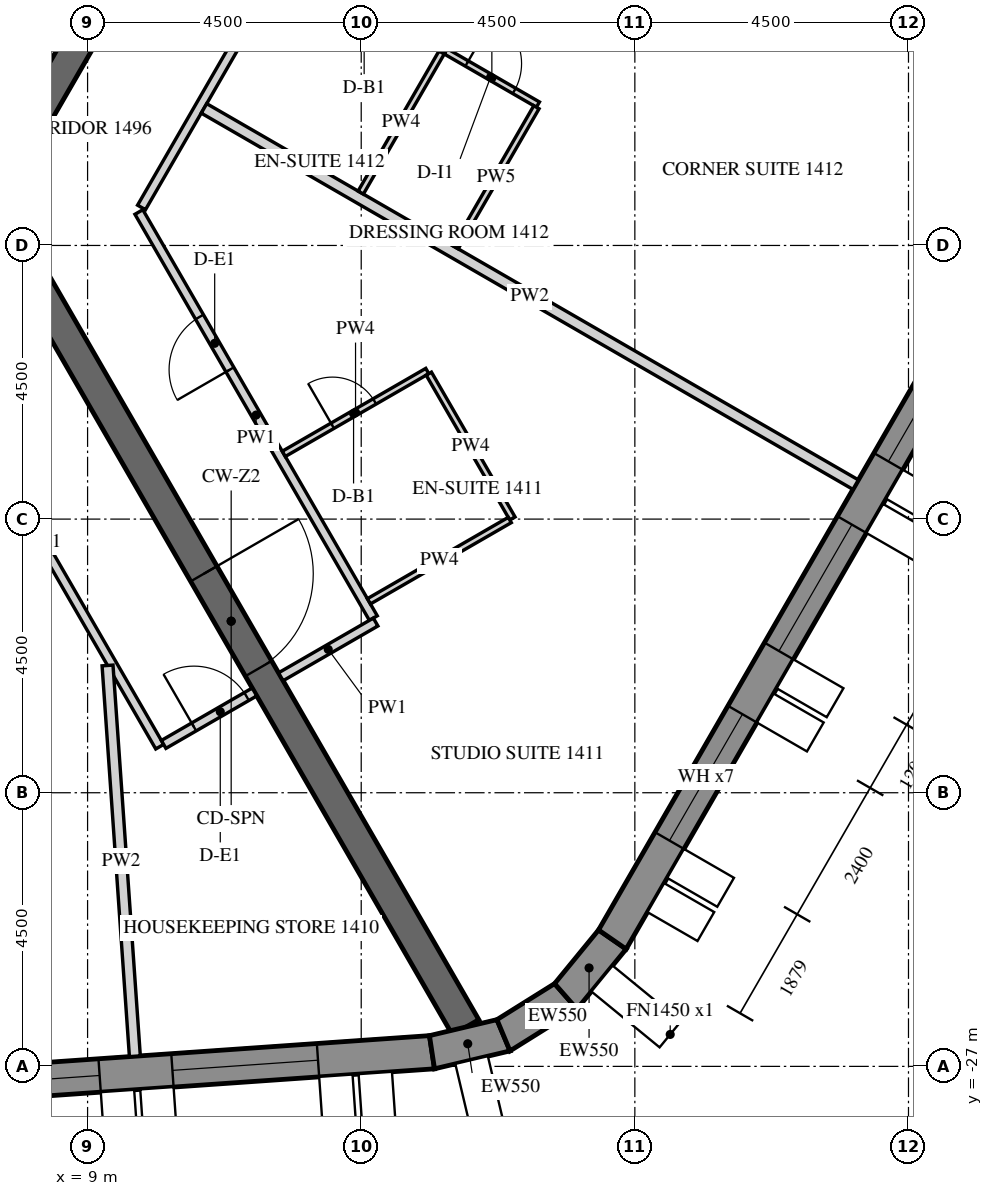
"""IFC4 building model, lengths in metres.
Left out: names, types, materials, properties, quantities, classifications, styles, units other than length and angle.
Written with IfcOpenShell. Run it as: python <this file> out.ifc"""

import sys

from ifc_helpers import new_model, si_unit, direction, frame, frame_2d, origin, place, context, subcontext, project, spatial, polyline, rectangle, outline, extrude, element, fill, save


model = new_model("IFC4")
c1 = context("Model", 3, precision=1e-05, world=origin(), true_north=direction((0.0, 1.0)))
c2 = subcontext(c1, "Body", "Model", "MODEL_VIEW")
j1 = project(units=[si_unit("LENGTHUNIT", "METRE"), si_unit("PLANEANGLEUNIT", "RADIAN")], contexts=[c1])
p1 = place(None, origin())
s1 = spatial("IfcSite", under=j1, at=p1, CompositionType="ELEMENT")
p2 = place(p1, origin())
s2 = spatial("IfcBuilding", under=s1, at=p2, CompositionType="ELEMENT")
p3 = place(p2, frame((0.0, 0.0, 183.9)))
s3 = spatial("IfcBuildingStorey", under=s2, at=p3, CompositionType="ELEMENT", Elevation=183.9)
p4 = place(p3, frame((-13.026, -28.704, -0.15), z_axis=(0.0, 0.0, 1.0), x_axis=(0.99756406806, 0.069756219185, 0.0)))
e1 = element("IfcWall", 1, at=p4, inside=s3, PredefinedType="SOLIDWALL", context=c2, shape_type="SweptSolid", body=[
    extrude(outline(polyline([(-0.026, -0.275), (27.78, -0.275), (27.735, 0.275), (0.026, 0.275), (-0.026, -0.275)])), origin(), (0.0, 0.0, 1.0), 3.9),
])
p5 = place(p4, frame((1.879, 0.0, 1.05)))
e2 = element("IfcOpeningElement", 2, at=p5, cuts=e1, PredefinedType="OPENING", context=c2, shape_type="SweptSolid", body=[
    extrude(rectangle(XDim=2.4, YDim=2.4, at=frame_2d((1.2, 1.2))), frame((0.0, 0.285, 0.0), z_axis=(0.0, -1.0, 0.0), x_axis=(1.0, 0.0, 0.0)), (0.0, 0.0, 1.0), 0.57),
])
p6 = place(p4, frame((5.479, 0.0, 1.05)))
e3 = element("IfcOpeningElement", 3, at=p6, cuts=e1, PredefinedType="OPENING", context=c2, shape_type="SweptSolid", body=[
    extrude(rectangle(XDim=2.4, YDim=2.4, at=frame_2d((1.2, 1.2))), frame((0.0, 0.285, 0.0), z_axis=(0.0, -1.0, 0.0), x_axis=(1.0, 0.0, 0.0)), (0.0, 0.0, 1.0), 0.57),
])
p7 = place(p4, frame((9.079, 0.0, 1.05)))
e4 = element("IfcOpeningElement", 4, at=p7, cuts=e1, PredefinedType="OPENING", context=c2, shape_type="SweptSolid", body=[
    extrude(rectangle(XDim=2.4, YDim=2.4, at=frame_2d((1.2, 1.2))), frame((0.0, 0.285, 0.0), z_axis=(0.0, -1.0, 0.0), x_axis=(1.0, 0.0, 0.0)), (0.0, 0.0, 1.0), 0.57),
])
p8 = place(p4, frame((12.679, 0.0, 1.05)))
e5 = element("IfcOpeningElement", 5, at=p8, cuts=e1, PredefinedType="OPENING", context=c2, shape_type="SweptSolid", body=[
    extrude(rectangle(XDim=2.4, YDim=2.4, at=frame_2d((1.2, 1.2))), frame((0.0, 0.285, 0.0), z_axis=(0.0, -1.0, 0.0), x_axis=(1.0, 0.0, 0.0)), (0.0, 0.0, 1.0), 0.57),
])
p9 = place(p4, frame((16.279, 0.0, 1.05)))
e6 = element("IfcOpeningElement", 6, at=p9, cuts=e1, PredefinedType="OPENING", context=c2, shape_type="SweptSolid", body=[
    extrude(rectangle(XDim=2.4, YDim=2.4, at=frame_2d((1.2, 1.2))), frame((0.0, 0.285, 0.0), z_axis=(0.0, -1.0, 0.0), x_axis=(1.0, 0.0, 0.0)), (0.0, 0.0, 1.0), 0.57),
])
p10 = place(p4, frame((19.879, 0.0, 1.05)))
e7 = element("IfcOpeningElement", 7, at=p10, cuts=e1, PredefinedType="OPENING", context=c2, shape_type="SweptSolid", body=[
    extrude(rectangle(XDim=2.4, YDim=2.4, at=frame_2d((1.2, 1.2))), frame((0.0, 0.285, 0.0), z_axis=(0.0, -1.0, 0.0), x_axis=(1.0, 0.0, 0.0)), (0.0, 0.0, 1.0), 0.57),
])
p11 = place(p4, frame((23.479, 0.0, 1.05)))
e8 = element("IfcOpeningElement", 8, at=p11, cuts=e1, PredefinedType="OPENING", context=c2, shape_type="SweptSolid", body=[
    extrude(rectangle(XDim=2.4, YDim=2.4, at=frame_2d((1.2, 1.2))), frame((0.0, 0.285, 0.0), z_axis=(0.0, -1.0, 0.0), x_axis=(1.0, 0.0, 0.0)), (0.0, 0.0, 1.0), 0.57),
])
p12 = place(p3, frame((14.664, -26.767, -0.15), z_axis=(0.0, 0.0, 1.0), x_axis=(0.973063591128, 0.230536868247, 0.0)))
e9 = element("IfcWall", 9, at=p12, inside=s3, PredefinedType="SOLIDWALL", context=c2, shape_type="SweptSolid", body=[
    extrude(outline(polyline([(-0.022, -0.275), (1.253, -0.275), (1.163, 0.275), (0.022, 0.275), (-0.022, -0.275)])), origin(), (0.0, 0.0, 1.0), 3.9),
])
p13 = place(p3, frame((15.84, -26.489, -0.15), z_axis=(0.0, 0.0, 1.0), x_axis=(0.848009655012, 0.52998077796, 0.0)))
e10 = element("IfcWall", 10, at=p13, inside=s3, PredefinedType="SOLIDWALL", context=c2, shape_type="SweptSolid", body=[
    extrude(outline(polyline([(-0.045, -0.275), (1.253, -0.275), (1.163, 0.275), (0.045, 0.275), (-0.045, -0.275)])), origin(), (0.0, 0.0, 1.0), 3.9),
])
p14 = place(p3, frame((16.864, -25.848, -0.15), z_axis=(0.0, 0.0, 1.0), x_axis=(0.633842757806, 0.773461930787, 0.0)))
e11 = element("IfcWall", 11, at=p14, inside=s3, PredefinedType="SOLIDWALL", context=c2, shape_type="SweptSolid", body=[
    extrude(outline(polyline([(-0.045, -0.275), (1.231, -0.275), (1.186, 0.275), (0.045, 0.275), (-0.045, -0.275)])), origin(), (0.0, 0.0, 1.0), 3.9),
])
p15 = place(p3, frame((17.63, -24.914, -0.15), z_axis=(0.0, 0.0, 1.0), x_axis=(0.499998569178, 0.866026229868, 0.0)))
e12 = element("IfcWall", 12, at=p15, inside=s3, PredefinedType="SOLIDWALL", context=c2, shape_type="SweptSolid", body=[
    extrude(outline(polyline([(-0.022, -0.275), (27.783, -0.275), (27.732, 0.275), (0.022, 0.275), (-0.022, -0.275)])), origin(), (0.0, 0.0, 1.0), 3.9),
])
p16 = place(p15, frame((1.879, 0.0, 1.05)))
e13 = element("IfcOpeningElement", 13, at=p16, cuts=e12, PredefinedType="OPENING", context=c2, shape_type="SweptSolid", body=[
    extrude(rectangle(XDim=2.4, YDim=2.4, at=frame_2d((1.2, 1.2))), frame((0.0, 0.285, 0.0), z_axis=(0.0, -1.0, 0.0), x_axis=(1.0, 0.0, 0.0)), (0.0, 0.0, 1.0), 0.57),
])
p17 = place(p15, frame((5.479, 0.0, 1.05)))
e14 = element("IfcOpeningElement", 14, at=p17, cuts=e12, PredefinedType="OPENING", context=c2, shape_type="SweptSolid", body=[
    extrude(rectangle(XDim=2.4, YDim=2.4, at=frame_2d((1.2, 1.2))), frame((0.0, 0.285, 0.0), z_axis=(0.0, -1.0, 0.0), x_axis=(1.0, 0.0, 0.0)), (0.0, 0.0, 1.0), 0.57),
])
p18 = place(p15, frame((9.079, 0.0, 1.05)))
e15 = element("IfcOpeningElement", 15, at=p18, cuts=e12, PredefinedType="OPENING", context=c2, shape_type="SweptSolid", body=[
    extrude(rectangle(XDim=2.4, YDim=2.4, at=frame_2d((1.2, 1.2))), frame((0.0, 0.285, 0.0), z_axis=(0.0, -1.0, 0.0), x_axis=(1.0, 0.0, 0.0)), (0.0, 0.0, 1.0), 0.57),
])
p19 = place(p15, frame((12.679, 0.0, 1.05)))
e16 = element("IfcOpeningElement", 16, at=p19, cuts=e12, PredefinedType="OPENING", context=c2, shape_type="SweptSolid", body=[
    extrude(rectangle(XDim=2.4, YDim=2.4, at=frame_2d((1.2, 1.2))), frame((0.0, 0.285, 0.0), z_axis=(0.0, -1.0, 0.0), x_axis=(1.0, 0.0, 0.0)), (0.0, 0.0, 1.0), 0.57),
])
p20 = place(p15, frame((16.279, 0.0, 1.05)))
e17 = element("IfcOpeningElement", 17, at=p20, cuts=e12, PredefinedType="OPENING", context=c2, shape_type="SweptSolid", body=[
    extrude(rectangle(XDim=2.4, YDim=2.4, at=frame_2d((1.2, 1.2))), frame((0.0, 0.285, 0.0), z_axis=(0.0, -1.0, 0.0), x_axis=(1.0, 0.0, 0.0)), (0.0, 0.0, 1.0), 0.57),
])
p21 = place(p15, frame((19.879, 0.0, 1.05)))
e18 = element("IfcOpeningElement", 18, at=p21, cuts=e12, PredefinedType="OPENING", context=c2, shape_type="SweptSolid", body=[
    extrude(rectangle(XDim=2.4, YDim=2.4, at=frame_2d((1.2, 1.2))), frame((0.0, 0.285, 0.0), z_axis=(0.0, -1.0, 0.0), x_axis=(1.0, 0.0, 0.0)), (0.0, 0.0, 1.0), 0.57),
])
p22 = place(p15, frame((23.479, 0.0, 1.05)))
e19 = element("IfcOpeningElement", 19, at=p22, cuts=e12, PredefinedType="OPENING", context=c2, shape_type="SweptSolid", body=[
    extrude(rectangle(XDim=2.4, YDim=2.4, at=frame_2d((1.2, 1.2))), frame((0.0, 0.285, 0.0), z_axis=(0.0, -1.0, 0.0), x_axis=(1.0, 0.0, 0.0)), (0.0, 0.0, 1.0), 0.57),
])
p23 = place(p3, frame((7.361, -12.75, -0.15), z_axis=(0.0, 0.0, 1.0), x_axis=(0.50000571537, 0.866022103989, 0.0)))
e20 = element("IfcWall", 20, at=p23, inside=s3, PredefinedType="SHEAR", context=c2, shape_type="SweptSolid", body=[
    extrude(outline(polyline([(-0.144, -0.25), (14.867, -0.25), (14.578, 0.25), (0.144, 0.25), (-0.144, -0.25)])), origin(), (0.0, 0.0, 1.0), 3.9),
])
p24 = place(p23, frame((6.49, 0.0, 0.15)))
e21 = element("IfcOpeningElement", 21, at=p24, cuts=e20, PredefinedType="OPENING", context=c2, shape_type="SweptSolid", body=[
    extrude(rectangle(XDim=1.8, YDim=2.4, at=frame_2d((0.9, 1.2))), frame((0.0, 0.26, 0.0), z_axis=(0.0, -1.0, 0.0), x_axis=(1.0, 0.0, 0.0)), (0.0, 0.0, 1.0), 0.52),
])
p25 = place(p3, frame((7.506, -13.0, -0.15), z_axis=(0.0, 0.0, 1.0), x_axis=(0.499988271576, -0.866032175087, 0.0)))
e22 = element("IfcWall", 22, at=p25, inside=s3, PredefinedType="SHEAR", context=c2, shape_type="SweptSolid", body=[
    extrude(rectangle(XDim=15.424, YDim=0.5, at=frame_2d((7.712, 0.0))), origin(), (0.0, 0.0, 1.0), 3.9),
])
p26 = place(p25, frame((6.812, 0.0, 0.15)))
e23 = element("IfcOpeningElement", 23, at=p26, cuts=e22, PredefinedType="OPENING", context=c2, shape_type="SweptSolid", body=[
    extrude(rectangle(XDim=1.8, YDim=2.4, at=frame_2d((0.9, 1.2))), frame((0.0, 0.26, 0.0), z_axis=(0.0, -1.0, 0.0), x_axis=(1.0, 0.0, 0.0)), (0.0, 0.0, 1.0), 0.52),
])
p27 = place(p3, frame((6.293, -15.0, 0.0), z_axis=(0.0, 0.0, 1.0), x_axis=(0.499980313799, -0.86603676932, 0.0)))
e24 = element("IfcWall", 24, at=p27, inside=s3, PredefinedType="PARTITIONING", context=c2, shape_type="SweptSolid", body=[
    extrude(rectangle(XDim=7.786, YDim=0.15, at=frame_2d((3.893, 0.0))), origin(), (0.0, 0.0, 1.0), 2.988),
])
p28 = place(p3, frame((10.251, -21.705, 0.0), z_axis=(0.0, 0.0, 1.0), x_axis=(0.866013532718, 0.500020560727, 0.0)))
e25 = element("IfcWall", 25, at=p28, inside=s3, PredefinedType="PARTITIONING", context=c2, shape_type="SweptSolid", body=[
    extrude(rectangle(XDim=1.725, YDim=0.15, at=frame_2d((0.863, 0.0))), origin(), (0.0, 0.0, 1.0), 2.988),
])
p29 = place(p28, frame((0.575, 0.0, 0.0)))
e26 = element("IfcOpeningElement", 26, at=p29, cuts=e25, PredefinedType="OPENING", context=c2, shape_type="SweptSolid", body=[
    extrude(rectangle(XDim=1.0, YDim=2.1, at=frame_2d((0.5, 1.05))), frame((0.0, 0.085, 0.0), z_axis=(0.0, -1.0, 0.0), x_axis=(1.0, 0.0, 0.0)), (0.0, 0.0, 1.0), 0.17),
])
p30 = place(p3, frame((13.699, -19.628, 0.0), z_axis=(0.0, 0.0, 1.0), x_axis=(-0.499993780622, 0.866028994514, 0.0)))
e27 = element("IfcWall", 27, at=p30, inside=s3, PredefinedType="PARTITIONING", context=c2, shape_type="SweptSolid", body=[
    extrude(rectangle(XDim=7.711, YDim=0.15, at=frame_2d((3.855, 0.0))), origin(), (0.0, 0.0, 1.0), 2.988),
])
p31 = place(p30, frame((4.718, 0.0, 0.0)))
e28 = element("IfcOpeningElement", 28, at=p31, cuts=e27, PredefinedType="OPENING", context=c2, shape_type="SweptSolid", body=[
    extrude(rectangle(XDim=1.0, YDim=2.1, at=frame_2d((0.5, 1.05))), frame((0.0, 0.085, 0.0), z_axis=(0.0, -1.0, 0.0), x_axis=(1.0, 0.0, 0.0)), (0.0, 0.0, 1.0), 0.17),
])
p32 = place(p3, frame((9.887, -12.875, 0.0), z_axis=(0.0, 0.0, 1.0), x_axis=(0.499998228944, 0.866026426302, 0.0)))
e29 = element("IfcWall", 29, at=p32, inside=s3, PredefinedType="PARTITIONING", context=c2, shape_type="SweptSolid", body=[
    extrude(rectangle(XDim=14.867, YDim=0.15, at=frame_2d((7.433, 0.0))), origin(), (0.0, 0.0, 1.0), 2.988),
])
p33 = place(p32, frame((8.224, 0.0, 0.0)))
e30 = element("IfcOpeningElement", 30, at=p33, cuts=e29, PredefinedType="OPENING", context=c2, shape_type="SweptSolid", body=[
    extrude(rectangle(XDim=1.0, YDim=2.1, at=frame_2d((0.5, 1.05))), frame((0.0, 0.085, 0.0), z_axis=(0.0, -1.0, 0.0), x_axis=(1.0, 0.0, 0.0)), (0.0, 0.0, 1.0), 0.17),
])
p34 = place(p32, frame((13.717, 0.0, 0.0)))
e31 = element("IfcOpeningElement", 31, at=p34, cuts=e29, PredefinedType="OPENING", context=c2, shape_type="SweptSolid", body=[
    extrude(rectangle(XDim=1.0, YDim=2.1, at=frame_2d((0.5, 1.05))), frame((0.0, 0.085, 0.0), z_axis=(0.0, -1.0, 0.0), x_axis=(1.0, 0.0, 0.0)), (0.0, 0.0, 1.0), 0.17),
])
p35 = place(p3, frame((12.178, -20.593, 0.0), z_axis=(0.0, 0.0, 1.0), x_axis=(0.866047807691, 0.499961193289, 0.0)))
e32 = element("IfcWall", 32, at=p35, inside=s3, PredefinedType="PARTITIONING", context=c2, shape_type="SweptSolid", body=[
    extrude(rectangle(XDim=1.8, YDim=0.15, at=frame_2d((0.9, 0.0))), origin(), (0.0, 0.0, 1.0), 2.988),
])
p36 = place(p3, frame((9.778, -26.833, 0.0), z_axis=(0.0, 0.0, 1.0), x_axis=(-0.069733334443, 0.997565668048, 0.0)))
e33 = element("IfcWall", 33, at=p36, inside=s3, PredefinedType="PARTITIONING", context=c2, shape_type="SweptSolid", body=[
    extrude(rectangle(XDim=6.442, YDim=0.18, at=frame_2d((3.221, 0.0))), origin(), (0.0, 0.0, 1.0), 2.988),
])
p37 = place(p3, frame((12.227, -16.927, 0.0), z_axis=(0.0, 0.0, 1.0), x_axis=(0.866012511928, 0.500022328685, 0.0)))
e34 = element("IfcWall", 34, at=p37, inside=s3, PredefinedType="PARTITIONING", context=c2, shape_type="SweptSolid", body=[
    extrude(rectangle(XDim=2.725, YDim=0.1, at=frame_2d((1.363, 0.0))), origin(), (0.0, 0.0, 1.0), 2.988),
])
p38 = place(p37, frame((0.925, 0.0, 0.0)))
e35 = element("IfcOpeningElement", 35, at=p38, cuts=e34, PredefinedType="OPENING", context=c2, shape_type="SweptSolid", body=[
    extrude(rectangle(XDim=0.8, YDim=2.1, at=frame_2d((0.4, 1.05))), frame((0.0, 0.06, 0.0), z_axis=(0.0, -1.0, 0.0), x_axis=(1.0, 0.0, 0.0)), (0.0, 0.0, 1.0), 0.12),
])
p39 = place(p3, frame((14.612, -15.608, 0.0), z_axis=(0.0, 0.0, 1.0), x_axis=(0.499996545922, -0.866027397988, 0.0)))
e36 = element("IfcWall", 36, at=p39, inside=s3, PredefinedType="PARTITIONING", context=c2, shape_type="SweptSolid", body=[
    extrude(rectangle(XDim=2.75, YDim=0.1, at=frame_2d((1.375, 0.0))), origin(), (0.0, 0.0, 1.0), 2.988),
])
p40 = place(p3, frame((15.943, -18.015, 0.0), z_axis=(0.0, 0.0, 1.0), x_axis=(-0.866004723184, -0.50003581814, 0.0)))
e37 = element("IfcWall", 37, at=p40, inside=s3, PredefinedType="PARTITIONING", context=c2, shape_type="SweptSolid", body=[
    extrude(rectangle(XDim=2.675, YDim=0.1, at=frame_2d((1.337, 0.0))), origin(), (0.0, 0.0, 1.0), 2.988),
])
p41 = place(p3, frame((21.631, -17.433, 0.0), z_axis=(0.0, 0.0, 1.0), x_axis=(-0.866024931941, 0.500000817256, 0.0)))
e38 = element("IfcWall", 38, at=p41, inside=s3, PredefinedType="PARTITIONING", context=c2, shape_type="SweptSolid", body=[
    extrude(rectangle(XDim=12.375, YDim=0.18, at=frame_2d((6.188, 0.0))), origin(), (0.0, 0.0, 1.0), 2.988),
])
p42 = place(p3, frame((12.314, -8.821, 0.0), z_axis=(0.0, 0.0, 1.0), x_axis=(0.866046596414, -0.499963291492, 0.0)))
e39 = element("IfcWall", 39, at=p42, inside=s3, PredefinedType="PARTITIONING", context=c2, shape_type="SweptSolid", body=[
    extrude(rectangle(XDim=2.925, YDim=0.1, at=frame_2d((1.462, 0.0))), origin(), (0.0, 0.0, 1.0), 2.988),
])
p43 = place(p42, frame((1.025, 0.0, 0.0)))
e40 = element("IfcOpeningElement", 40, at=p43, cuts=e39, PredefinedType="OPENING", context=c2, shape_type="SweptSolid", body=[
    extrude(rectangle(XDim=0.8, YDim=2.1, at=frame_2d((0.4, 1.05))), frame((0.0, 0.06, 0.0), z_axis=(0.0, -1.0, 0.0), x_axis=(1.0, 0.0, 0.0)), (0.0, 0.0, 1.0), 0.12),
])
p44 = place(p3, frame((14.891, -10.309, 0.0), z_axis=(0.0, 0.0, 1.0), x_axis=(0.866036909293, -0.499980071345, 0.0)))
e41 = element("IfcWall", 41, at=p44, inside=s3, PredefinedType="PARTITIONING", context=c2, shape_type="SweptSolid", body=[
    extrude(rectangle(XDim=1.75, YDim=0.1, at=frame_2d((0.875, 0.0))), origin(), (0.0, 0.0, 1.0), 2.988),
])
p45 = place(p44, frame((0.4, 0.0, 0.0)))
e42 = element("IfcOpeningElement", 42, at=p45, cuts=e41, PredefinedType="OPENING", context=c2, shape_type="SweptSolid", body=[
    extrude(rectangle(XDim=0.9, YDim=2.1, at=frame_2d((0.45, 1.05))), frame((0.0, 0.06, 0.0), z_axis=(0.0, -1.0, 0.0), x_axis=(1.0, 0.0, 0.0)), (0.0, 0.0, 1.0), 0.12),
])
p46 = place(p3, frame((16.381, -11.227, 0.0), z_axis=(0.0, 0.0, 1.0), x_axis=(-0.500008456887, -0.866020521143, 0.0)))
e43 = element("IfcWall", 43, at=p46, inside=s3, PredefinedType="PARTITIONING", context=c2, shape_type="SweptSolid", body=[
    extrude(rectangle(XDim=2.66, YDim=0.1, at=frame_2d((1.33, 0.0))), origin(), (0.0, 0.0, 1.0), 2.988),
])
p47 = place(p3, frame((25.231, -11.198, 0.0), z_axis=(0.0, 0.0, 1.0), x_axis=(-0.866033062874, 0.499986733834, 0.0)))
e44 = element("IfcWall", 44, at=p47, inside=s3, PredefinedType="PARTITIONING", context=c2, shape_type="SweptSolid", body=[
    extrude(rectangle(XDim=7.65, YDim=0.1, at=frame_2d((3.825, 0.0))), origin(), (0.0, 0.0, 1.0), 2.988),
])
p48 = place(p3, frame((13.492, -12.63, 0.0), z_axis=(0.0, 0.0, 1.0), x_axis=(0.50004820116, 0.865997573043, 0.0)))
e45 = element("IfcWall", 45, at=p48, inside=s3, PredefinedType="PARTITIONING", context=c2, shape_type="SweptSolid", body=[
    extrude(rectangle(XDim=2.66, YDim=0.1, at=frame_2d((1.33, 0.0))), origin(), (0.0, 0.0, 1.0), 2.988),
])
p49 = place(p10, frame((0.0, 0.205, 0.0)))
e46 = element("IfcWindow", 46, at=p49, inside=s3, PartitioningType="DOUBLE_PANEL_VERTICAL", PredefinedType="WINDOW", context=c2, shape_type="SweptSolid", body=[
    extrude(rectangle(XDim=2.4, YDim=2.4, at=frame_2d((1.2, 1.2))), frame((0.0, 0.03, 0.0), z_axis=(0.0, -1.0, 0.0), x_axis=(1.0, 0.0, 0.0)), (0.0, 0.0, 1.0), 0.06),
])
fill(e7, e46)
p50 = place(p11, frame((0.0, 0.205, 0.0)))
e47 = element("IfcWindow", 47, at=p50, inside=s3, PartitioningType="DOUBLE_PANEL_VERTICAL", PredefinedType="WINDOW", context=c2, shape_type="SweptSolid", body=[
    extrude(rectangle(XDim=2.4, YDim=2.4, at=frame_2d((1.2, 1.2))), frame((0.0, 0.03, 0.0), z_axis=(0.0, -1.0, 0.0), x_axis=(1.0, 0.0, 0.0)), (0.0, 0.0, 1.0), 0.06),
])
fill(e8, e47)
p51 = place(p16, frame((0.0, 0.205, 0.0)))
e48 = element("IfcWindow", 48, at=p51, inside=s3, PartitioningType="DOUBLE_PANEL_VERTICAL", PredefinedType="WINDOW", context=c2, shape_type="SweptSolid", body=[
    extrude(rectangle(XDim=2.4, YDim=2.4, at=frame_2d((1.2, 1.2))), frame((0.0, 0.03, 0.0), z_axis=(0.0, -1.0, 0.0), x_axis=(1.0, 0.0, 0.0)), (0.0, 0.0, 1.0), 0.06),
])
fill(e13, e48)
p52 = place(p17, frame((0.0, 0.205, 0.0)))
e49 = element("IfcWindow", 49, at=p52, inside=s3, PartitioningType="DOUBLE_PANEL_VERTICAL", PredefinedType="WINDOW", context=c2, shape_type="SweptSolid", body=[
    extrude(rectangle(XDim=2.4, YDim=2.4, at=frame_2d((1.2, 1.2))), frame((0.0, 0.03, 0.0), z_axis=(0.0, -1.0, 0.0), x_axis=(1.0, 0.0, 0.0)), (0.0, 0.0, 1.0), 0.06),
])
fill(e14, e49)
p53 = place(p18, frame((0.0, 0.205, 0.0)))
e50 = element("IfcWindow", 50, at=p53, inside=s3, PartitioningType="DOUBLE_PANEL_VERTICAL", PredefinedType="WINDOW", context=c2, shape_type="SweptSolid", body=[
    extrude(rectangle(XDim=2.4, YDim=2.4, at=frame_2d((1.2, 1.2))), frame((0.0, 0.03, 0.0), z_axis=(0.0, -1.0, 0.0), x_axis=(1.0, 0.0, 0.0)), (0.0, 0.0, 1.0), 0.06),
])
fill(e15, e50)
p54 = place(p26, origin())
e51 = element("IfcDoor", 51, at=p54, inside=s3, OperationType="DOUBLE_DOOR_SINGLE_SWING", PredefinedType="DOOR", context=c2, shape_type="SweptSolid", body=[
    extrude(rectangle(XDim=1.8, YDim=2.4, at=frame_2d((0.9, 1.2))), frame((0.0, 0.025, 0.0), z_axis=(0.0, -1.0, 0.0), x_axis=(1.0, 0.0, 0.0)), (0.0, 0.0, 1.0), 0.05),
])
fill(e23, e51)
p55 = place(p29, origin())
e52 = element("IfcDoor", 52, at=p55, inside=s3, OperationType="SINGLE_SWING_LEFT", PredefinedType="DOOR", context=c2, shape_type="SweptSolid", body=[
    extrude(rectangle(XDim=1.0, YDim=2.1, at=frame_2d((0.5, 1.05))), frame((0.0, 0.025, 0.0), z_axis=(0.0, -1.0, 0.0), x_axis=(1.0, 0.0, 0.0)), (0.0, 0.0, 1.0), 0.05),
])
fill(e26, e52)
p56 = place(p31, origin())
e53 = element("IfcDoor", 53, at=p56, inside=s3, OperationType="SINGLE_SWING_LEFT", PredefinedType="DOOR", context=c2, shape_type="SweptSolid", body=[
    extrude(rectangle(XDim=1.0, YDim=2.1, at=frame_2d((0.5, 1.05))), frame((0.0, 0.025, 0.0), z_axis=(0.0, -1.0, 0.0), x_axis=(1.0, 0.0, 0.0)), (0.0, 0.0, 1.0), 0.05),
])
fill(e28, e53)
p57 = place(p38, origin())
e54 = element("IfcDoor", 54, at=p57, inside=s3, OperationType="SINGLE_SWING_RIGHT", PredefinedType="DOOR", context=c2, shape_type="SweptSolid", body=[
    extrude(rectangle(XDim=0.8, YDim=2.1, at=frame_2d((0.4, 1.05))), frame((0.0, 0.025, 0.0), z_axis=(0.0, -1.0, 0.0), x_axis=(1.0, 0.0, 0.0)), (0.0, 0.0, 1.0), 0.05),
])
fill(e35, e54)
p58 = place(p45, origin())
e55 = element("IfcDoor", 55, at=p58, inside=s3, OperationType="SINGLE_SWING_RIGHT", PredefinedType="DOOR", context=c2, shape_type="SweptSolid", body=[
    extrude(rectangle(XDim=0.9, YDim=2.1, at=frame_2d((0.45, 1.05))), frame((0.0, 0.025, 0.0), z_axis=(0.0, -1.0, 0.0), x_axis=(1.0, 0.0, 0.0)), (0.0, 0.0, 1.0), 0.05),
])
fill(e42, e55)
save(model, sys.argv[1])
